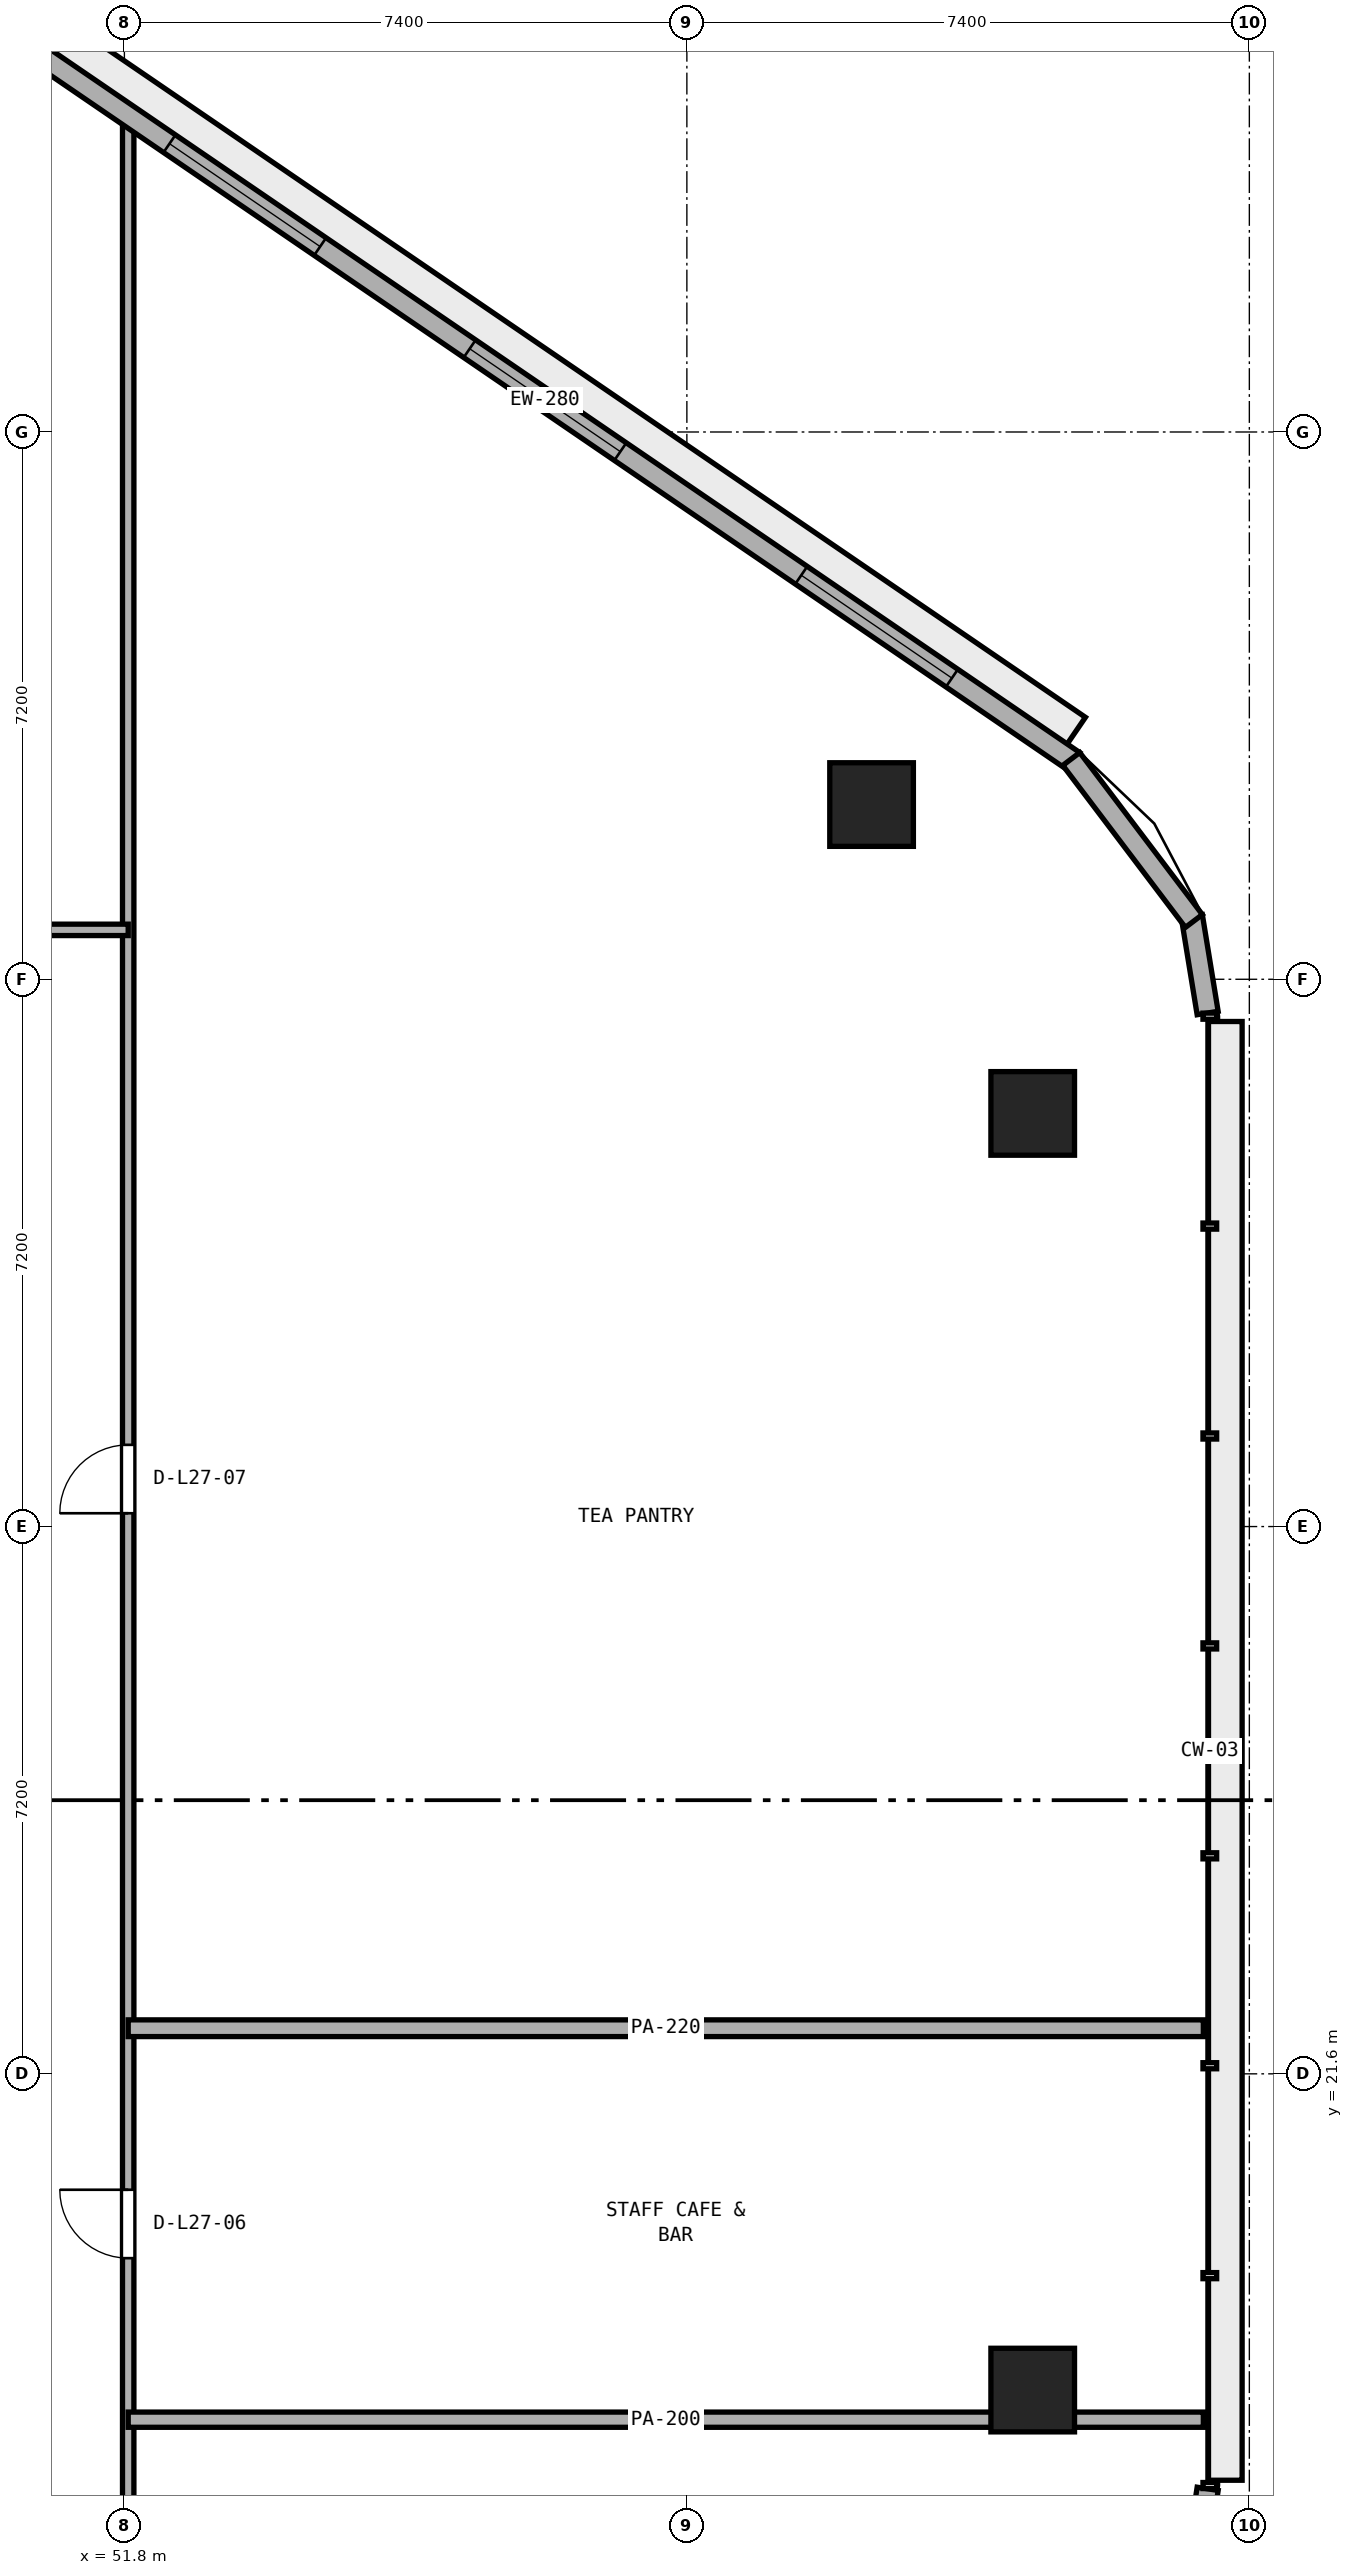
"""IFC4 building model, lengths in metres.
Left out: names, types, materials, properties, quantities, classifications, styles, units other than length and angle.
Written with IfcOpenShell. Run it as: python <this file> out.ifc"""

import sys

from ifc_helpers import new_model, si_unit, direction, frame, frame_2d, origin, origin_2d, place, context, subcontext, project, spatial, rectangle, extrude, element, fill, save


model = new_model("IFC4")
c1 = context("Model", 3, precision=1e-05, world=origin(), true_north=direction((0.0, 1.0)))
c2 = subcontext(c1, "Body", "Model", "MODEL_VIEW")
j1 = project(units=[si_unit("LENGTHUNIT", "METRE"), si_unit("PLANEANGLEUNIT", "RADIAN")], contexts=[c1])
p1 = place(None, origin())
s1 = spatial("IfcSite", under=j1, at=p1, CompositionType="ELEMENT")
p2 = place(p1, origin())
s2 = spatial("IfcBuilding", under=s1, at=p2, CompositionType="ELEMENT")
p3 = place(p2, frame((0.0, 0.0, 108.6)))
s3 = spatial("IfcBuildingStorey", under=s2, at=p3, CompositionType="ELEMENT", Elevation=108.6)
for number, where, z_axis, x_axis in (
    (1, (63.75, 17.44, 0.0), (0.0, 0.0, 1.0), (1.0, 0.0, 0.0)),
    (2, (63.75, 34.235, 0.0), (0.0, 0.0, 1.0), (1.0, 0.0, 0.0)),
    (3, (61.63, 38.299, 0.0), (0.0, 0.0, 1.0), (1.0, 0.0, 0.0)),
):
    element("IfcColumn", number, at=place(p3, frame(where, z_axis=z_axis, x_axis=x_axis)), inside=s3, PredefinedType="COLUMN", context=c2, shape_type="SweptSolid", body=[
        extrude(rectangle(XDim=1.1, YDim=1.1, at=origin_2d()), origin(), (0.0, 0.0, 1.0), 3.8),
    ])
p4 = place(p3, frame((51.85, 13.75, 0.0), z_axis=(0.0, 0.0, 1.0), x_axis=(0.0, 1.0, 0.0)))
e4 = element("IfcWall", 4, at=p4, inside=s3, PredefinedType="PARTITIONING", context=c2, shape_type="SweptSolid", body=[
    extrude(rectangle(XDim=33.644, YDim=0.15, at=frame_2d((16.822, 0.0))), origin(), (0.0, 0.0, 1.0), 3.525),
])
p5 = place(p4, frame((5.425, 0.0, 0.0)))
e5 = element("IfcOpeningElement", 5, at=p5, cuts=e4, PredefinedType="OPENING", context=c2, shape_type="SweptSolid", body=[
    extrude(rectangle(XDim=0.9, YDim=2.1, at=frame_2d((0.45, 1.05))), frame((0.0, 0.085, 0.0), z_axis=(0.0, -1.0, 0.0), x_axis=(1.0, 0.0, 0.0)), (0.0, 0.0, 1.0), 0.17),
])
p6 = place(p4, frame((15.225, 0.0, 0.0)))
e6 = element("IfcOpeningElement", 6, at=p6, cuts=e4, PredefinedType="OPENING", context=c2, shape_type="SweptSolid", body=[
    extrude(rectangle(XDim=0.9, YDim=2.1, at=frame_2d((0.45, 1.05))), frame((0.0, 0.085, 0.0), z_axis=(0.0, -1.0, 0.0), x_axis=(1.0, 0.0, 0.0)), (0.0, 0.0, 1.0), 0.17),
])
p7 = place(p3, frame((51.85, 17.05, 0.0), z_axis=(0.0, 0.0, 1.0), x_axis=(1.0, 0.0, 0.0)))
e7 = element("IfcWall", 7, at=p7, inside=s3, PredefinedType="PARTITIONING", context=c2, shape_type="SweptSolid", body=[
    extrude(rectangle(XDim=14.145, YDim=0.2, at=frame_2d((7.073, 0.0))), origin(), (0.0, 0.0, 1.0), 3.525),
])
p8 = place(p3, frame((51.85, 22.2, 0.0), z_axis=(0.0, 0.0, 1.0), x_axis=(1.0, 0.0, 0.0)))
e8 = element("IfcWall", 8, at=p8, inside=s3, PredefinedType="PARTITIONING", context=c2, shape_type="SweptSolid", body=[
    extrude(rectangle(XDim=14.145, YDim=0.22, at=frame_2d((7.073, 0.0))), origin(), (0.0, 0.0, 1.0), 3.525),
])
p9 = place(p3, frame((22.15, 36.65, 0.0), z_axis=(0.0, 0.0, 1.0), x_axis=(1.0, 0.0, 0.0)))
e9 = element("IfcWall", 9, at=p9, inside=s3, PredefinedType="PARTITIONING", context=c2, shape_type="SweptSolid", body=[
    extrude(rectangle(XDim=29.7, YDim=0.15, at=frame_2d((14.85, 0.0))), origin(), (0.0, 0.0, 1.0), 3.525),
])
p10 = place(p9, frame((4.145, 0.0, 0.0)))
e10 = element("IfcOpeningElement", 10, at=p10, cuts=e9, PredefinedType="OPENING", context=c2, shape_type="SweptSolid", body=[
    extrude(rectangle(XDim=1.0, YDim=2.12, at=frame_2d((0.5, 1.06))), frame((0.0, 0.085, 0.0), z_axis=(0.0, -1.0, 0.0), x_axis=(1.0, 0.0, 0.0)), (0.0, 0.0, 1.0), 0.17),
])
p11 = place(p9, frame((18.755, 0.0, 0.0)))
e11 = element("IfcOpeningElement", 11, at=p11, cuts=e9, PredefinedType="OPENING", context=c2, shape_type="SweptSolid", body=[
    extrude(rectangle(XDim=1.0, YDim=2.12, at=frame_2d((0.5, 1.06))), frame((0.0, 0.085, 0.0), z_axis=(0.0, -1.0, 0.0), x_axis=(1.0, 0.0, 0.0)), (0.0, 0.0, 1.0), 0.17),
])
p12 = place(p3, frame((64.29, 38.867, 0.0), z_axis=(0.0, 0.0, 1.0), x_axis=(-0.825755550159, 0.564028165416, 0.0)))
e12 = element("IfcWall", 12, at=p12, inside=s3, PredefinedType="STANDARD", context=c2, shape_type="SweptSolid", body=[
    extrude(rectangle(XDim=16.848, YDim=0.28, at=frame_2d((8.424, 0.0))), origin(), (0.0, 0.0, 1.0), 3.525),
])
p13 = place(p12, frame((1.941, 0.0, 0.9)))
e13 = element("IfcOpeningElement", 13, at=p13, cuts=e12, PredefinedType="OPENING", context=c2, shape_type="SweptSolid", body=[
    extrude(rectangle(XDim=2.4, YDim=1.75, at=frame_2d((1.2, 0.875))), frame((0.0, 0.15, 0.0), z_axis=(0.0, -1.0, 0.0), x_axis=(1.0, 0.0, 0.0)), (0.0, 0.0, 1.0), 0.3),
])
p14 = place(p12, frame((7.224, 0.0, 0.9)))
e14 = element("IfcOpeningElement", 14, at=p14, cuts=e12, PredefinedType="OPENING", context=c2, shape_type="SweptSolid", body=[
    extrude(rectangle(XDim=2.4, YDim=1.75, at=frame_2d((1.2, 0.875))), frame((0.0, 0.15, 0.0), z_axis=(0.0, -1.0, 0.0), x_axis=(1.0, 0.0, 0.0)), (0.0, 0.0, 1.0), 0.3),
])
p15 = place(p12, frame((12.007, 0.0, 0.9)))
e15 = element("IfcOpeningElement", 15, at=p15, cuts=e12, PredefinedType="OPENING", context=c2, shape_type="SweptSolid", body=[
    extrude(rectangle(XDim=2.4, YDim=1.75, at=frame_2d((1.2, 0.875))), frame((0.0, 0.15, 0.0), z_axis=(0.0, -1.0, 0.0), x_axis=(1.0, 0.0, 0.0)), (0.0, 0.0, 1.0), 0.3),
])
p16 = place(p3, frame((65.867, 14.943, 0.0), z_axis=(0.0, 0.0, 1.0), x_axis=(0.152102600021, 0.988364709541, 0.0)))
e16 = element("IfcWall", 16, at=p16, inside=s3, PredefinedType="STANDARD", context=c2, shape_type="SweptSolid", body=[
    extrude(rectangle(XDim=1.212, YDim=0.28, at=frame_2d((0.606, 0.0))), origin(), (0.0, 0.0, 1.0), 3.525),
])
p17 = place(p3, frame((66.052, 35.556, 0.0), z_axis=(0.0, 0.0, 1.0), x_axis=(-0.161357776207, 0.98689597631, 0.0)))
e17 = element("IfcWall", 17, at=p17, inside=s3, PredefinedType="STANDARD", context=c2, shape_type="SweptSolid", body=[
    extrude(rectangle(XDim=1.289, YDim=0.28, at=frame_2d((0.645, 0.0))), origin(), (0.0, 0.0, 1.0), 3.525),
])
p18 = place(p3, frame((65.87, 36.767, 0.0), z_axis=(0.0, 0.0, 1.0), x_axis=(-0.603370463754, 0.797461023166, 0.0)))
e18 = element("IfcWall", 18, at=p18, inside=s3, PredefinedType="STANDARD", context=c2, shape_type="SweptSolid", body=[
    extrude(rectangle(XDim=2.673, YDim=0.28, at=frame_2d((1.336, 0.0))), origin(), (0.0, 0.0, 1.0), 3.525),
])
p19 = place(p5, origin())
e19 = element("IfcDoor", 19, at=p19, inside=s3, OperationType="SINGLE_SWING_RIGHT", PredefinedType="DOOR", context=c2, shape_type="SweptSolid", body=[
    extrude(rectangle(XDim=0.9, YDim=2.1, at=frame_2d((0.45, 1.05))), frame((0.0, 0.025, 0.0), z_axis=(0.0, -1.0, 0.0), x_axis=(1.0, 0.0, 0.0)), (0.0, 0.0, 1.0), 0.05),
])
fill(e5, e19)
p20 = place(p6, origin())
e20 = element("IfcDoor", 20, at=p20, inside=s3, OperationType="SINGLE_SWING_LEFT", PredefinedType="DOOR", context=c2, shape_type="SweptSolid", body=[
    extrude(rectangle(XDim=0.9, YDim=2.1, at=frame_2d((0.45, 1.05))), frame((0.0, 0.025, 0.0), z_axis=(0.0, -1.0, 0.0), x_axis=(1.0, 0.0, 0.0)), (0.0, 0.0, 1.0), 0.05),
])
fill(e6, e20)
p21 = place(p13, origin())
e21 = element("IfcWindow", 21, at=p21, inside=s3, PartitioningType="SINGLE_PANEL", PredefinedType="WINDOW", context=c2, shape_type="SweptSolid", body=[
    extrude(rectangle(XDim=2.4, YDim=1.75, at=frame_2d((1.2, 0.875))), frame((0.0, 0.03, 0.0), z_axis=(0.0, -1.0, 0.0), x_axis=(1.0, 0.0, 0.0)), (0.0, 0.0, 1.0), 0.06),
])
fill(e13, e21)
p22 = place(p14, origin())
e22 = element("IfcWindow", 22, at=p22, inside=s3, PartitioningType="SINGLE_PANEL", PredefinedType="WINDOW", context=c2, shape_type="SweptSolid", body=[
    extrude(rectangle(XDim=2.4, YDim=1.75, at=frame_2d((1.2, 0.875))), frame((0.0, 0.03, 0.0), z_axis=(0.0, -1.0, 0.0), x_axis=(1.0, 0.0, 0.0)), (0.0, 0.0, 1.0), 0.06),
])
fill(e14, e22)
p23 = place(p15, origin())
e23 = element("IfcWindow", 23, at=p23, inside=s3, PartitioningType="SINGLE_PANEL", PredefinedType="WINDOW", context=c2, shape_type="SweptSolid", body=[
    extrude(rectangle(XDim=2.4, YDim=1.75, at=frame_2d((1.2, 0.875))), frame((0.0, 0.03, 0.0), z_axis=(0.0, -1.0, 0.0), x_axis=(1.0, 0.0, 0.0)), (0.0, 0.0, 1.0), 0.06),
])
fill(e15, e23)
save(model, sys.argv[1])
